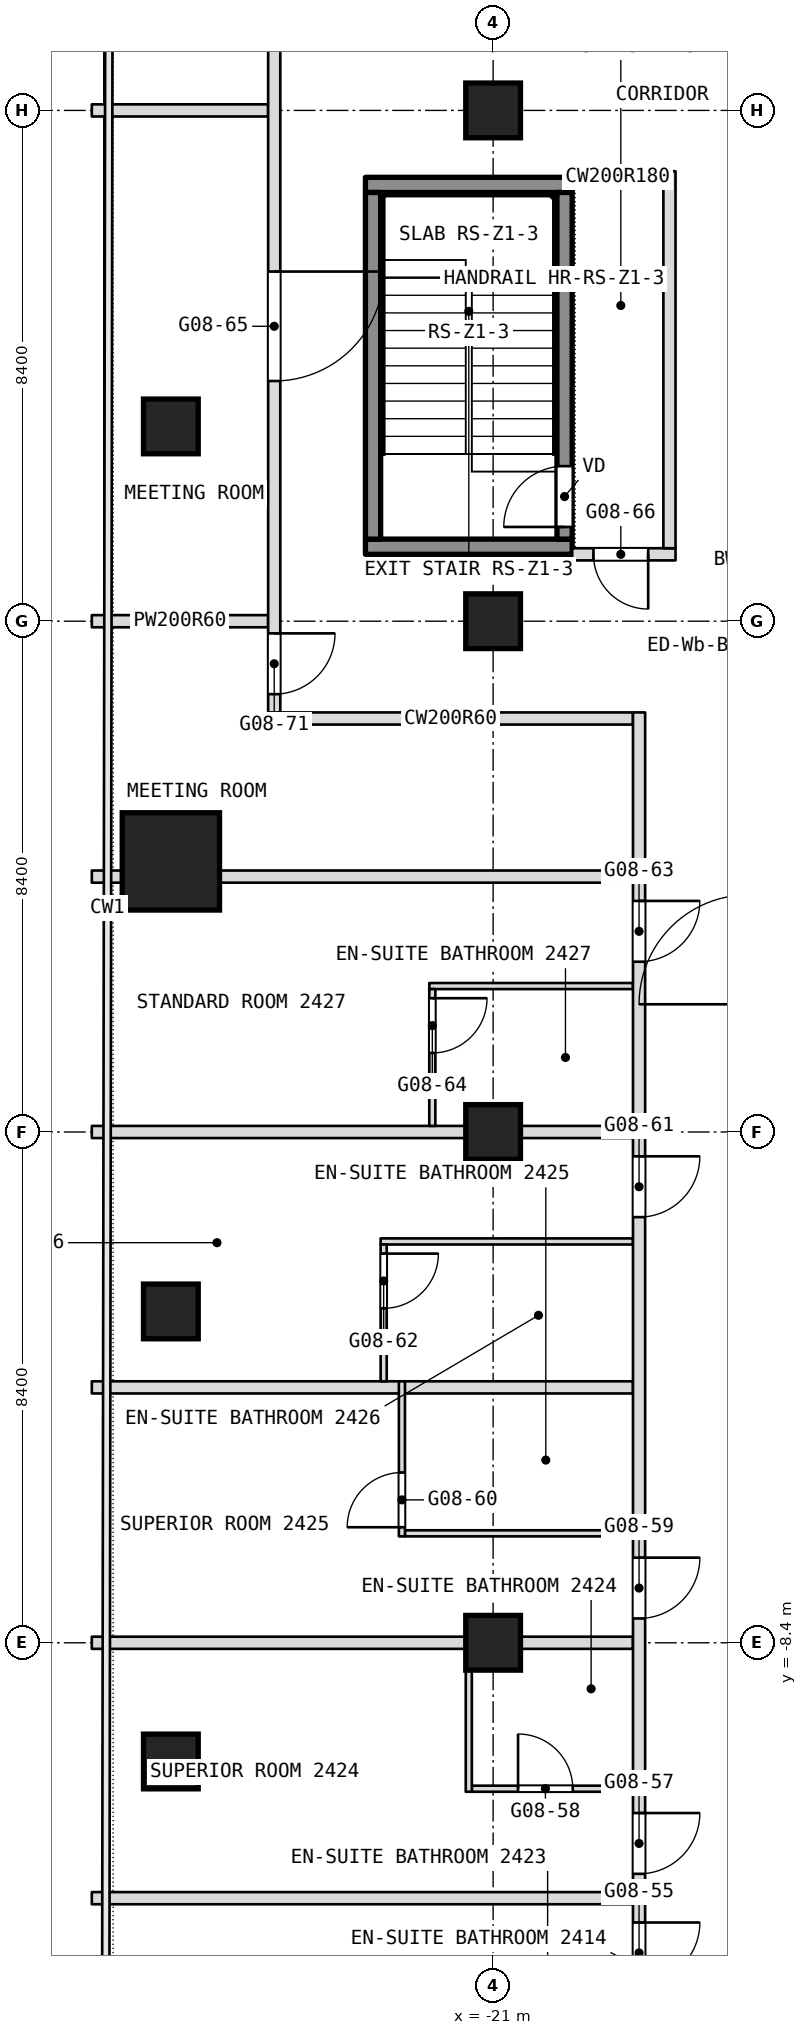
"""IFC4 building model, lengths in metres.
Left out: names, types, materials, properties, quantities, classifications, styles, units other than length and angle.
Written with IfcOpenShell. Run it as: python <this file> out.ifc"""

import sys

from ifc_helpers import new_model, si_unit, direction, frame, frame_2d, origin, origin_2d, place, context, subcontext, project, spatial, rectangle, extrude, element, fill, save


model = new_model("IFC4")
c1 = context("Model", 3, precision=1e-05, world=origin(), true_north=direction((0.0, 1.0)))
c2 = subcontext(c1, "Body", "Model", "MODEL_VIEW")
j1 = project(units=[si_unit("LENGTHUNIT", "METRE"), si_unit("PLANEANGLEUNIT", "RADIAN")], contexts=[c1])
p1 = place(None, origin())
s1 = spatial("IfcSite", under=j1, at=p1, CompositionType="ELEMENT")
p2 = place(p1, origin())
s2 = spatial("IfcBuilding", under=s1, at=p2, CompositionType="ELEMENT")
p3 = place(p2, frame((0.0, 0.0, 112.1)))
s3 = spatial("IfcBuildingStorey", under=s2, at=p3, CompositionType="ELEMENT", Elevation=112.1)
p4 = place(p3, frame((-26.3, 4.45, 0.0), z_axis=(0.0, 0.0, 1.0), x_axis=(1.0, 0.0, 0.0)))
e1 = element("IfcColumn", 1, at=p4, inside=s3, PredefinedType="COLUMN", context=c2, shape_type="SweptSolid", body=[
    extrude(rectangle(XDim=1.6, YDim=1.6, at=origin_2d()), origin(), (0.0, 0.0, 1.0), 3.6),
])
for number, where, z_axis, x_axis in (
    (2, (-21.0, -8.4, 0.0), (0.0, 0.0, 1.0), (1.0, 0.0, 0.0)),
    (3, (-21.0, 0.0, 0.0), (0.0, 0.0, 1.0), (1.0, 0.0, 0.0)),
    (4, (-21.0, 8.4, 0.0), (0.0, 0.0, 1.0), (1.0, 0.0, 0.0)),
    (5, (-21.0, 16.8, 0.0), (0.0, 0.0, 1.0), (1.0, 0.0, 0.0)),
    (6, (-26.3, -10.352, 0.0), (0.0, 0.0, 1.0), (1.0, 0.0, 0.0)),
    (7, (-26.3, -2.951, 0.0), (0.0, 0.0, 1.0), (1.0, 0.0, 0.0)),
    (8, (-26.3, 11.603, 0.0), (0.0, 0.0, 1.0), (1.0, 0.0, 0.0)),
):
    element("IfcColumn", number, at=place(p3, frame(where, z_axis=z_axis, x_axis=x_axis)), inside=s3, PredefinedType="COLUMN", context=c2, shape_type="SweptSolid", body=[
        extrude(rectangle(XDim=0.9, YDim=0.9, at=origin_2d()), origin(), (0.0, 0.0, 1.0), 3.6),
    ])
p5 = place(p3, frame((-27.6, -12.6, 0.0), z_axis=(0.0, 0.0, 1.0), x_axis=(1.0, 0.0, 0.0)))
e9 = element("IfcWall", 9, at=p5, inside=s3, PredefinedType="PARTITIONING", context=c2, shape_type="SweptSolid", body=[
    extrude(rectangle(XDim=8.9, YDim=0.2, at=frame_2d((4.45, 0.0))), origin(), (0.0, 0.0, 1.0), 3.34),
])
p6 = place(p3, frame((-21.35, -10.8, 0.0), z_axis=(0.0, 0.0, 1.0), x_axis=(1.0, 0.0, 0.0)))
e10 = element("IfcWall", 10, at=p6, inside=s3, PredefinedType="PARTITIONING", context=c2, shape_type="SweptSolid", body=[
    extrude(rectangle(XDim=2.65, YDim=0.1, at=frame_2d((1.325, 0.0))), origin(), (0.0, 0.0, 1.0), 3.34),
])
p7 = place(p6, frame((0.76, 0.0, 0.0)))
e11 = element("IfcOpeningElement", 11, at=p7, cuts=e10, PredefinedType="OPENING", context=c2, shape_type="SweptSolid", body=[
    extrude(rectangle(XDim=0.9, YDim=2.1, at=frame_2d((0.45, 1.05))), frame((0.0, 0.05, 0.0), z_axis=(0.0, -1.0, 0.0), x_axis=(1.0, 0.0, 0.0)), (0.0, 0.0, 1.0), 0.1),
])
p8 = place(p3, frame((-27.6, -8.4, 0.0), z_axis=(0.0, 0.0, 1.0), x_axis=(1.0, 0.0, 0.0)))
e12 = element("IfcWall", 12, at=p8, inside=s3, PredefinedType="PARTITIONING", context=c2, shape_type="SweptSolid", body=[
    extrude(rectangle(XDim=8.9, YDim=0.2, at=frame_2d((4.45, 0.0))), origin(), (0.0, 0.0, 1.0), 2.89),
])
p9 = place(p3, frame((-22.45, -6.6, 0.0), z_axis=(0.0, 0.0, 1.0), x_axis=(1.0, 0.0, 0.0)))
e13 = element("IfcWall", 13, at=p9, inside=s3, PredefinedType="PARTITIONING", context=c2, shape_type="SweptSolid", body=[
    extrude(rectangle(XDim=3.75, YDim=0.1, at=frame_2d((1.875, 0.0))), origin(), (0.0, 0.0, 1.0), 3.34),
])
p10 = place(p3, frame((-27.6, -4.2, 0.0), z_axis=(0.0, 0.0, 1.0), x_axis=(1.0, 0.0, 0.0)))
e14 = element("IfcWall", 14, at=p10, inside=s3, PredefinedType="PARTITIONING", context=c2, shape_type="SweptSolid", body=[
    extrude(rectangle(XDim=8.9, YDim=0.2, at=frame_2d((4.45, 0.0))), origin(), (0.0, 0.0, 1.0), 3.34),
])
p11 = place(p3, frame((-22.85, -1.8, 0.0), z_axis=(0.0, 0.0, 1.0), x_axis=(1.0, 0.0, 0.0)))
e15 = element("IfcWall", 15, at=p11, inside=s3, PredefinedType="PARTITIONING", context=c2, shape_type="SweptSolid", body=[
    extrude(rectangle(XDim=4.15, YDim=0.1, at=frame_2d((2.075, 0.0))), origin(), (0.0, 0.0, 1.0), 3.34),
])
p12 = place(p3, frame((-27.6, 0.0, 0.0), z_axis=(0.0, 0.0, 1.0), x_axis=(1.0, 0.0, 0.0)))
e16 = element("IfcWall", 16, at=p12, inside=s3, PredefinedType="PARTITIONING", context=c2, shape_type="SweptSolid", body=[
    extrude(rectangle(XDim=8.9, YDim=0.2, at=frame_2d((4.45, 0.0))), origin(), (0.0, 0.0, 1.0), 2.89),
])
p13 = place(p3, frame((-22.05, 2.4, 0.0), z_axis=(0.0, 0.0, 1.0), x_axis=(1.0, 0.0, 0.0)))
e17 = element("IfcWall", 17, at=p13, inside=s3, PredefinedType="PARTITIONING", context=c2, shape_type="SweptSolid", body=[
    extrude(rectangle(XDim=3.35, YDim=0.1, at=frame_2d((1.675, 0.0))), origin(), (0.0, 0.0, 1.0), 3.34),
])
p14 = place(p3, frame((-27.6, 4.2, 0.0), z_axis=(0.0, 0.0, 1.0), x_axis=(1.0, 0.0, 0.0)))
e18 = element("IfcWall", 18, at=p14, inside=s3, PredefinedType="PARTITIONING", context=c2, shape_type="SweptSolid", body=[
    extrude(rectangle(XDim=0.5, YDim=0.2, at=frame_2d((0.25, 0.0))), origin(), (0.0, 0.0, 1.0), 3.34),
])
p15 = place(p3, frame((-25.5, 4.2, 0.0), z_axis=(0.0, 0.0, 1.0), x_axis=(1.0, 0.0, 0.0)))
e19 = element("IfcWall", 19, at=p15, inside=s3, PredefinedType="PARTITIONING", context=c2, shape_type="SweptSolid", body=[
    extrude(rectangle(XDim=6.8, YDim=0.2, at=frame_2d((3.4, 0.0))), origin(), (0.0, 0.0, 1.0), 3.34),
])
p16 = place(p3, frame((-24.7, 6.8, 0.0), z_axis=(0.0, 0.0, 1.0), x_axis=(1.0, 0.0, 0.0)))
e20 = element("IfcWall", 20, at=p16, inside=s3, PredefinedType="PARTITIONING", context=c2, shape_type="SweptSolid", body=[
    extrude(rectangle(XDim=6.0, YDim=0.2, at=frame_2d((3.0, 0.0))), origin(), (0.0, 0.0, 1.0), 3.34),
])
p17 = place(p3, frame((-27.6, 8.4, 0.0), z_axis=(0.0, 0.0, 1.0), x_axis=(1.0, 0.0, 0.0)))
e21 = element("IfcWall", 21, at=p17, inside=s3, PredefinedType="PARTITIONING", context=c2, shape_type="SweptSolid", body=[
    extrude(rectangle(XDim=2.9, YDim=0.2, at=frame_2d((1.45, 0.0))), origin(), (0.0, 0.0, 1.0), 2.89),
])
p18 = place(p3, frame((-19.7, 9.5, 0.0), z_axis=(0.0, 0.0, 1.0), x_axis=(1.0, 0.0, 0.0)))
e22 = element("IfcWall", 22, at=p18, inside=s3, PredefinedType="PARTITIONING", context=c2, shape_type="SweptSolid", body=[
    extrude(rectangle(XDim=1.7, YDim=0.2, at=frame_2d((0.85, 0.0))), origin(), (0.0, 0.0, 1.0), 3.34),
])
p19 = place(p18, frame((0.35, 0.0, 0.0)))
e23 = element("IfcOpeningElement", 23, at=p19, cuts=e22, PredefinedType="OPENING", context=c2, shape_type="SweptSolid", body=[
    extrude(rectangle(XDim=0.9, YDim=2.1, at=frame_2d((0.45, 1.05))), frame((0.0, 0.1, 0.0), z_axis=(0.0, -1.0, 0.0), x_axis=(1.0, 0.0, 0.0)), (0.0, 0.0, 1.0), 0.2),
])
p20 = place(p3, frame((-19.7, 15.7, 0.0), z_axis=(0.0, 0.0, 1.0), x_axis=(1.0, 0.0, 0.0)))
e24 = element("IfcWall", 24, at=p20, inside=s3, PredefinedType="PARTITIONING", context=c2, shape_type="SweptSolid", body=[
    extrude(rectangle(XDim=1.5, YDim=0.2, at=frame_2d((0.75, 0.0))), origin(), (0.0, 0.0, 1.0), 3.34),
])
p21 = place(p3, frame((-27.6, 16.8, 0.0), z_axis=(0.0, 0.0, 1.0), x_axis=(1.0, 0.0, 0.0)))
e25 = element("IfcWall", 25, at=p21, inside=s3, PredefinedType="PARTITIONING", context=c2, shape_type="SweptSolid", body=[
    extrude(rectangle(XDim=2.9, YDim=0.2, at=frame_2d((1.45, 0.0))), origin(), (0.0, 0.0, 1.0), 2.89),
])
p22 = place(p3, frame((-18.1, 9.6, 0.0), z_axis=(0.0, 0.0, 1.0), x_axis=(0.0, 1.0, 0.0)))
e26 = element("IfcWall", 26, at=p22, inside=s3, PredefinedType="PARTITIONING", context=c2, shape_type="SweptSolid", body=[
    extrude(rectangle(XDim=6.2, YDim=0.2, at=frame_2d((3.1, 0.0))), origin(), (0.0, 0.0, 1.0), 3.34),
])
p23 = place(p3, frame((-18.6, -21.708, 0.0), z_axis=(0.0, 0.0, 1.0), x_axis=(0.0, 1.0, 0.0)))
e27 = element("IfcWall", 27, at=p23, inside=s3, PredefinedType="PARTITIONING", context=c2, shape_type="SweptSolid", body=[
    extrude(rectangle(XDim=28.608, YDim=0.2, at=frame_2d((14.304, 0.0))), origin(), (0.0, 0.0, 1.0), 3.34),
])
p24 = place(p23, frame((2.8, 0.0, 0.0)))
e28 = element("IfcOpeningElement", 28, at=p24, cuts=e27, PredefinedType="OPENING", context=c2, shape_type="SweptSolid", body=[
    extrude(rectangle(XDim=1.0, YDim=2.1, at=frame_2d((0.5, 1.05))), frame((0.0, 0.1, 0.0), z_axis=(0.0, -1.0, 0.0), x_axis=(1.0, 0.0, 0.0)), (0.0, 0.0, 1.0), 0.2),
])
p25 = place(p23, frame((7.708, 0.0, 0.0)))
e29 = element("IfcOpeningElement", 29, at=p25, cuts=e27, PredefinedType="OPENING", context=c2, shape_type="SweptSolid", body=[
    extrude(rectangle(XDim=1.0, YDim=2.1, at=frame_2d((0.5, 1.05))), frame((0.0, 0.1, 0.0), z_axis=(0.0, -1.0, 0.0), x_axis=(1.0, 0.0, 0.0)), (0.0, 0.0, 1.0), 0.2),
])
p26 = place(p23, frame((9.508, 0.0, 0.0)))
e30 = element("IfcOpeningElement", 30, at=p26, cuts=e27, PredefinedType="OPENING", context=c2, shape_type="SweptSolid", body=[
    extrude(rectangle(XDim=1.0, YDim=2.1, at=frame_2d((0.5, 1.05))), frame((0.0, 0.1, 0.0), z_axis=(0.0, -1.0, 0.0), x_axis=(1.0, 0.0, 0.0)), (0.0, 0.0, 1.0), 0.2),
])
p27 = place(p23, frame((13.708, 0.0, 0.0)))
e31 = element("IfcOpeningElement", 31, at=p27, cuts=e27, PredefinedType="OPENING", context=c2, shape_type="SweptSolid", body=[
    extrude(rectangle(XDim=1.0, YDim=2.1, at=frame_2d((0.5, 1.05))), frame((0.0, 0.1, 0.0), z_axis=(0.0, -1.0, 0.0), x_axis=(1.0, 0.0, 0.0)), (0.0, 0.0, 1.0), 0.2),
])
p28 = place(p23, frame((20.308, 0.0, 0.0)))
e32 = element("IfcOpeningElement", 32, at=p28, cuts=e27, PredefinedType="OPENING", context=c2, shape_type="SweptSolid", body=[
    extrude(rectangle(XDim=1.0, YDim=2.1, at=frame_2d((0.5, 1.05))), frame((0.0, 0.1, 0.0), z_axis=(0.0, -1.0, 0.0), x_axis=(1.0, 0.0, 0.0)), (0.0, 0.0, 1.0), 0.2),
])
p29 = place(p23, frame((24.508, 0.0, 0.0)))
e33 = element("IfcOpeningElement", 33, at=p29, cuts=e27, PredefinedType="OPENING", context=c2, shape_type="SweptSolid", body=[
    extrude(rectangle(XDim=1.0, YDim=2.1, at=frame_2d((0.5, 1.05))), frame((0.0, 0.1, 0.0), z_axis=(0.0, -1.0, 0.0), x_axis=(1.0, 0.0, 0.0)), (0.0, 0.0, 1.0), 0.2),
])
p30 = place(p3, frame((-21.4, -10.85, 0.0), z_axis=(0.0, 0.0, 1.0), x_axis=(0.0, 1.0, 0.0)))
e34 = element("IfcWall", 34, at=p30, inside=s3, PredefinedType="PARTITIONING", context=c2, shape_type="SweptSolid", body=[
    extrude(rectangle(XDim=2.55, YDim=0.1, at=frame_2d((1.275, 0.0))), origin(), (0.0, 0.0, 1.0), 3.34),
])
p31 = place(p3, frame((-22.0, 0.1, 0.0), z_axis=(0.0, 0.0, 1.0), x_axis=(0.0, 1.0, 0.0)))
e35 = element("IfcWall", 35, at=p31, inside=s3, PredefinedType="PARTITIONING", context=c2, shape_type="SweptSolid", body=[
    extrude(rectangle(XDim=2.25, YDim=0.1, at=frame_2d((1.125, 0.0))), origin(), (0.0, 0.0, 1.0), 3.34),
])
p32 = place(p31, frame((1.2, 0.0, 0.0)))
e36 = element("IfcOpeningElement", 36, at=p32, cuts=e35, PredefinedType="OPENING", context=c2, shape_type="SweptSolid", body=[
    extrude(rectangle(XDim=0.9, YDim=2.1, at=frame_2d((0.45, 1.05))), frame((0.0, 0.05, 0.0), z_axis=(0.0, -1.0, 0.0), x_axis=(1.0, 0.0, 0.0)), (0.0, 0.0, 1.0), 0.1),
])
p33 = place(p3, frame((-22.5, -6.65, 0.0), z_axis=(0.0, 0.0, 1.0), x_axis=(0.0, 1.0, 0.0)))
e37 = element("IfcWall", 37, at=p33, inside=s3, PredefinedType="PARTITIONING", context=c2, shape_type="SweptSolid", body=[
    extrude(rectangle(XDim=2.55, YDim=0.1, at=frame_2d((1.275, 0.0))), origin(), (0.0, 0.0, 1.0), 3.34),
])
p34 = place(p33, frame((0.15, 0.0, 0.0)))
e38 = element("IfcOpeningElement", 38, at=p34, cuts=e37, PredefinedType="OPENING", context=c2, shape_type="SweptSolid", body=[
    extrude(rectangle(XDim=0.9, YDim=2.1, at=frame_2d((0.45, 1.05))), frame((0.0, 0.05, 0.0), z_axis=(0.0, -1.0, 0.0), x_axis=(1.0, 0.0, 0.0)), (0.0, 0.0, 1.0), 0.1),
])
p35 = place(p3, frame((-22.8, -4.1, 0.0), z_axis=(0.0, 0.0, 1.0), x_axis=(0.0, 1.0, 0.0)))
e39 = element("IfcWall", 39, at=p35, inside=s3, PredefinedType="PARTITIONING", context=c2, shape_type="SweptSolid", body=[
    extrude(rectangle(XDim=2.25, YDim=0.1, at=frame_2d((1.125, 0.0))), origin(), (0.0, 0.0, 1.0), 3.34),
])
p36 = place(p35, frame((1.2, 0.0, 0.0)))
e40 = element("IfcOpeningElement", 40, at=p36, cuts=e39, PredefinedType="OPENING", context=c2, shape_type="SweptSolid", body=[
    extrude(rectangle(XDim=0.9, YDim=2.1, at=frame_2d((0.45, 1.05))), frame((0.0, 0.05, 0.0), z_axis=(0.0, -1.0, 0.0), x_axis=(1.0, 0.0, 0.0)), (0.0, 0.0, 1.0), 0.1),
])
p37 = place(p3, frame((-24.6, 6.9, 0.0), z_axis=(0.0, 0.0, 1.0), x_axis=(0.0, 1.0, 0.0)))
e41 = element("IfcWall", 41, at=p37, inside=s3, PredefinedType="PARTITIONING", context=c2, shape_type="SweptSolid", body=[
    extrude(rectangle(XDim=11.6, YDim=0.2, at=frame_2d((5.8, 0.0))), origin(), (0.0, 0.0, 1.0), 3.34),
])
p38 = place(p37, frame((5.45, 0.0, 0.0)))
e42 = element("IfcOpeningElement", 42, at=p38, cuts=e41, PredefinedType="OPENING", context=c2, shape_type="SweptSolid", body=[
    extrude(rectangle(XDim=1.8, YDim=2.1, at=frame_2d((0.9, 1.05))), frame((0.0, 0.1, 0.0), z_axis=(0.0, -1.0, 0.0), x_axis=(1.0, 0.0, 0.0)), (0.0, 0.0, 1.0), 0.2),
])
p39 = place(p37, frame((0.3, 0.0, 0.0)))
e43 = element("IfcOpeningElement", 43, at=p39, cuts=e41, PredefinedType="OPENING", context=c2, shape_type="SweptSolid", body=[
    extrude(rectangle(XDim=1.0, YDim=2.1, at=frame_2d((0.5, 1.05))), frame((0.0, 0.1, 0.0), z_axis=(0.0, -1.0, 0.0), x_axis=(1.0, 0.0, 0.0)), (0.0, 0.0, 1.0), 0.2),
])
for number, where, z_axis, x_axis in (
    (44, (-23.1, 9.625, 0.1), (0.0, 0.0, 1.0), (1.0, 0.0, 0.0)),
    (45, (-23.1, 15.575, 0.1), (0.0, 0.0, 1.0), (1.0, 0.0, 0.0)),
):
    element("IfcWall", number, at=place(p3, frame(where, z_axis=z_axis, x_axis=x_axis)), inside=s3, PredefinedType="SHEAR", context=c2, shape_type="SweptSolid", body=[
        extrude(rectangle(XDim=3.4, YDim=0.25, at=frame_2d((1.7, 0.0))), origin(), (0.0, 0.0, 1.0), 3.6),
    ])
p40 = place(p3, frame((-22.975, 9.75, 0.1), z_axis=(0.0, 0.0, 1.0), x_axis=(0.0, 1.0, 0.0)))
e46 = element("IfcWall", 46, at=p40, inside=s3, PredefinedType="SHEAR", context=c2, shape_type="SweptSolid", body=[
    extrude(rectangle(XDim=5.7, YDim=0.25, at=frame_2d((2.85, 0.0))), origin(), (0.0, 0.0, 1.0), 3.6),
])
p41 = place(p3, frame((-19.825, 9.75, 0.1), z_axis=(0.0, 0.0, 1.0), x_axis=(0.0, 1.0, 0.0)))
e47 = element("IfcWall", 47, at=p41, inside=s3, PredefinedType="SHEAR", context=c2, shape_type="SweptSolid", body=[
    extrude(rectangle(XDim=5.7, YDim=0.25, at=frame_2d((2.85, 0.0))), origin(), (0.0, 0.0, 1.0), 3.6),
])
p42 = place(p41, frame((0.2, 0.0, 0.0)))
e48 = element("IfcOpeningElement", 48, at=p42, cuts=e47, PredefinedType="OPENING", context=c2, shape_type="SweptSolid", body=[
    extrude(rectangle(XDim=1.0, YDim=2.1, at=frame_2d((0.5, 1.05))), frame((0.0, 0.125, 0.0), z_axis=(0.0, -1.0, 0.0), x_axis=(1.0, 0.0, 0.0)), (0.0, 0.0, 1.0), 0.25),
])
p43 = place(p7, origin())
e49 = element("IfcDoor", 49, at=p43, inside=s3, OperationType="SINGLE_SWING_LEFT", PredefinedType="DOOR", context=c2, shape_type="SweptSolid", body=[
    extrude(rectangle(XDim=0.9, YDim=2.1, at=frame_2d((0.45, 1.05))), frame((0.0, 0.025, 0.0), z_axis=(0.0, -1.0, 0.0), x_axis=(1.0, 0.0, 0.0)), (0.0, 0.0, 1.0), 0.05),
])
fill(e11, e49)
p44 = place(p19, origin())
e50 = element("IfcDoor", 50, at=p44, inside=s3, OperationType="SINGLE_SWING_RIGHT", PredefinedType="DOOR", context=c2, shape_type="SweptSolid", body=[
    extrude(rectangle(XDim=0.9, YDim=2.1, at=frame_2d((0.45, 1.05))), frame((0.0, 0.025, 0.0), z_axis=(0.0, -1.0, 0.0), x_axis=(1.0, 0.0, 0.0)), (0.0, 0.0, 1.0), 0.05),
])
fill(e23, e50)
p45 = place(p25, origin())
e51 = element("IfcDoor", 51, at=p45, inside=s3, OperationType="SINGLE_SWING_RIGHT", PredefinedType="DOOR", context=c2, shape_type="SweptSolid", body=[
    extrude(rectangle(XDim=1.0, YDim=2.1, at=frame_2d((0.5, 1.05))), frame((0.0, 0.025, 0.0), z_axis=(0.0, -1.0, 0.0), x_axis=(1.0, 0.0, 0.0)), (0.0, 0.0, 1.0), 0.05),
])
fill(e29, e51)
p46 = place(p26, origin())
e52 = element("IfcDoor", 52, at=p46, inside=s3, OperationType="SINGLE_SWING_RIGHT", PredefinedType="DOOR", context=c2, shape_type="SweptSolid", body=[
    extrude(rectangle(XDim=1.0, YDim=2.1, at=frame_2d((0.5, 1.05))), frame((0.0, 0.025, 0.0), z_axis=(0.0, -1.0, 0.0), x_axis=(1.0, 0.0, 0.0)), (0.0, 0.0, 1.0), 0.05),
])
fill(e30, e52)
p47 = place(p27, origin())
e53 = element("IfcDoor", 53, at=p47, inside=s3, OperationType="SINGLE_SWING_RIGHT", PredefinedType="DOOR", context=c2, shape_type="SweptSolid", body=[
    extrude(rectangle(XDim=1.0, YDim=2.1, at=frame_2d((0.5, 1.05))), frame((0.0, 0.025, 0.0), z_axis=(0.0, -1.0, 0.0), x_axis=(1.0, 0.0, 0.0)), (0.0, 0.0, 1.0), 0.05),
])
fill(e31, e53)
p48 = place(p28, origin())
e54 = element("IfcDoor", 54, at=p48, inside=s3, OperationType="SINGLE_SWING_RIGHT", PredefinedType="DOOR", context=c2, shape_type="SweptSolid", body=[
    extrude(rectangle(XDim=1.0, YDim=2.1, at=frame_2d((0.5, 1.05))), frame((0.0, 0.025, 0.0), z_axis=(0.0, -1.0, 0.0), x_axis=(1.0, 0.0, 0.0)), (0.0, 0.0, 1.0), 0.05),
])
fill(e32, e54)
p49 = place(p29, origin())
e55 = element("IfcDoor", 55, at=p49, inside=s3, OperationType="SINGLE_SWING_RIGHT", PredefinedType="DOOR", context=c2, shape_type="SweptSolid", body=[
    extrude(rectangle(XDim=1.0, YDim=2.1, at=frame_2d((0.5, 1.05))), frame((0.0, 0.025, 0.0), z_axis=(0.0, -1.0, 0.0), x_axis=(1.0, 0.0, 0.0)), (0.0, 0.0, 1.0), 0.05),
])
fill(e33, e55)
p50 = place(p32, origin())
e56 = element("IfcDoor", 56, at=p50, inside=s3, OperationType="SINGLE_SWING_LEFT", PredefinedType="DOOR", context=c2, shape_type="SweptSolid", body=[
    extrude(rectangle(XDim=0.9, YDim=2.1, at=frame_2d((0.45, 1.05))), frame((0.0, 0.025, 0.0), z_axis=(0.0, -1.0, 0.0), x_axis=(1.0, 0.0, 0.0)), (0.0, 0.0, 1.0), 0.05),
])
fill(e36, e56)
p51 = place(p34, origin())
e57 = element("IfcDoor", 57, at=p51, inside=s3, OperationType="SINGLE_SWING_RIGHT", PredefinedType="DOOR", context=c2, shape_type="SweptSolid", body=[
    extrude(rectangle(XDim=0.9, YDim=2.1, at=frame_2d((0.45, 1.05))), frame((0.0, 0.025, 0.0), z_axis=(0.0, -1.0, 0.0), x_axis=(1.0, 0.0, 0.0)), (0.0, 0.0, 1.0), 0.05),
])
fill(e38, e57)
p52 = place(p36, origin())
e58 = element("IfcDoor", 58, at=p52, inside=s3, OperationType="SINGLE_SWING_LEFT", PredefinedType="DOOR", context=c2, shape_type="SweptSolid", body=[
    extrude(rectangle(XDim=0.9, YDim=2.1, at=frame_2d((0.45, 1.05))), frame((0.0, 0.025, 0.0), z_axis=(0.0, -1.0, 0.0), x_axis=(1.0, 0.0, 0.0)), (0.0, 0.0, 1.0), 0.05),
])
fill(e40, e58)
p53 = place(p38, origin())
e59 = element("IfcDoor", 59, at=p53, inside=s3, OperationType="DOUBLE_DOOR_SINGLE_SWING", PredefinedType="DOOR", context=c2, shape_type="SweptSolid", body=[
    extrude(rectangle(XDim=1.8, YDim=2.1, at=frame_2d((0.9, 1.05))), frame((0.0, 0.025, 0.0), z_axis=(0.0, -1.0, 0.0), x_axis=(1.0, 0.0, 0.0)), (0.0, 0.0, 1.0), 0.05),
])
fill(e42, e59)
p54 = place(p39, origin())
e60 = element("IfcDoor", 60, at=p54, inside=s3, OperationType="SINGLE_SWING_LEFT", PredefinedType="DOOR", context=c2, shape_type="SweptSolid", body=[
    extrude(rectangle(XDim=1.0, YDim=2.1, at=frame_2d((0.5, 1.05))), frame((0.0, 0.025, 0.0), z_axis=(0.0, -1.0, 0.0), x_axis=(1.0, 0.0, 0.0)), (0.0, 0.0, 1.0), 0.05),
])
fill(e43, e60)
p55 = place(p42, origin())
e61 = element("IfcDoor", 61, at=p55, inside=s3, OperationType="SINGLE_SWING_LEFT", PredefinedType="DOOR", context=c2, shape_type="SweptSolid", body=[
    extrude(rectangle(XDim=1.0, YDim=2.1, at=frame_2d((0.5, 1.05))), frame((0.0, 0.025, 0.0), z_axis=(0.0, -1.0, 0.0), x_axis=(1.0, 0.0, 0.0)), (0.0, 0.0, 1.0), 0.05),
])
fill(e48, e61)
save(model, sys.argv[1])
